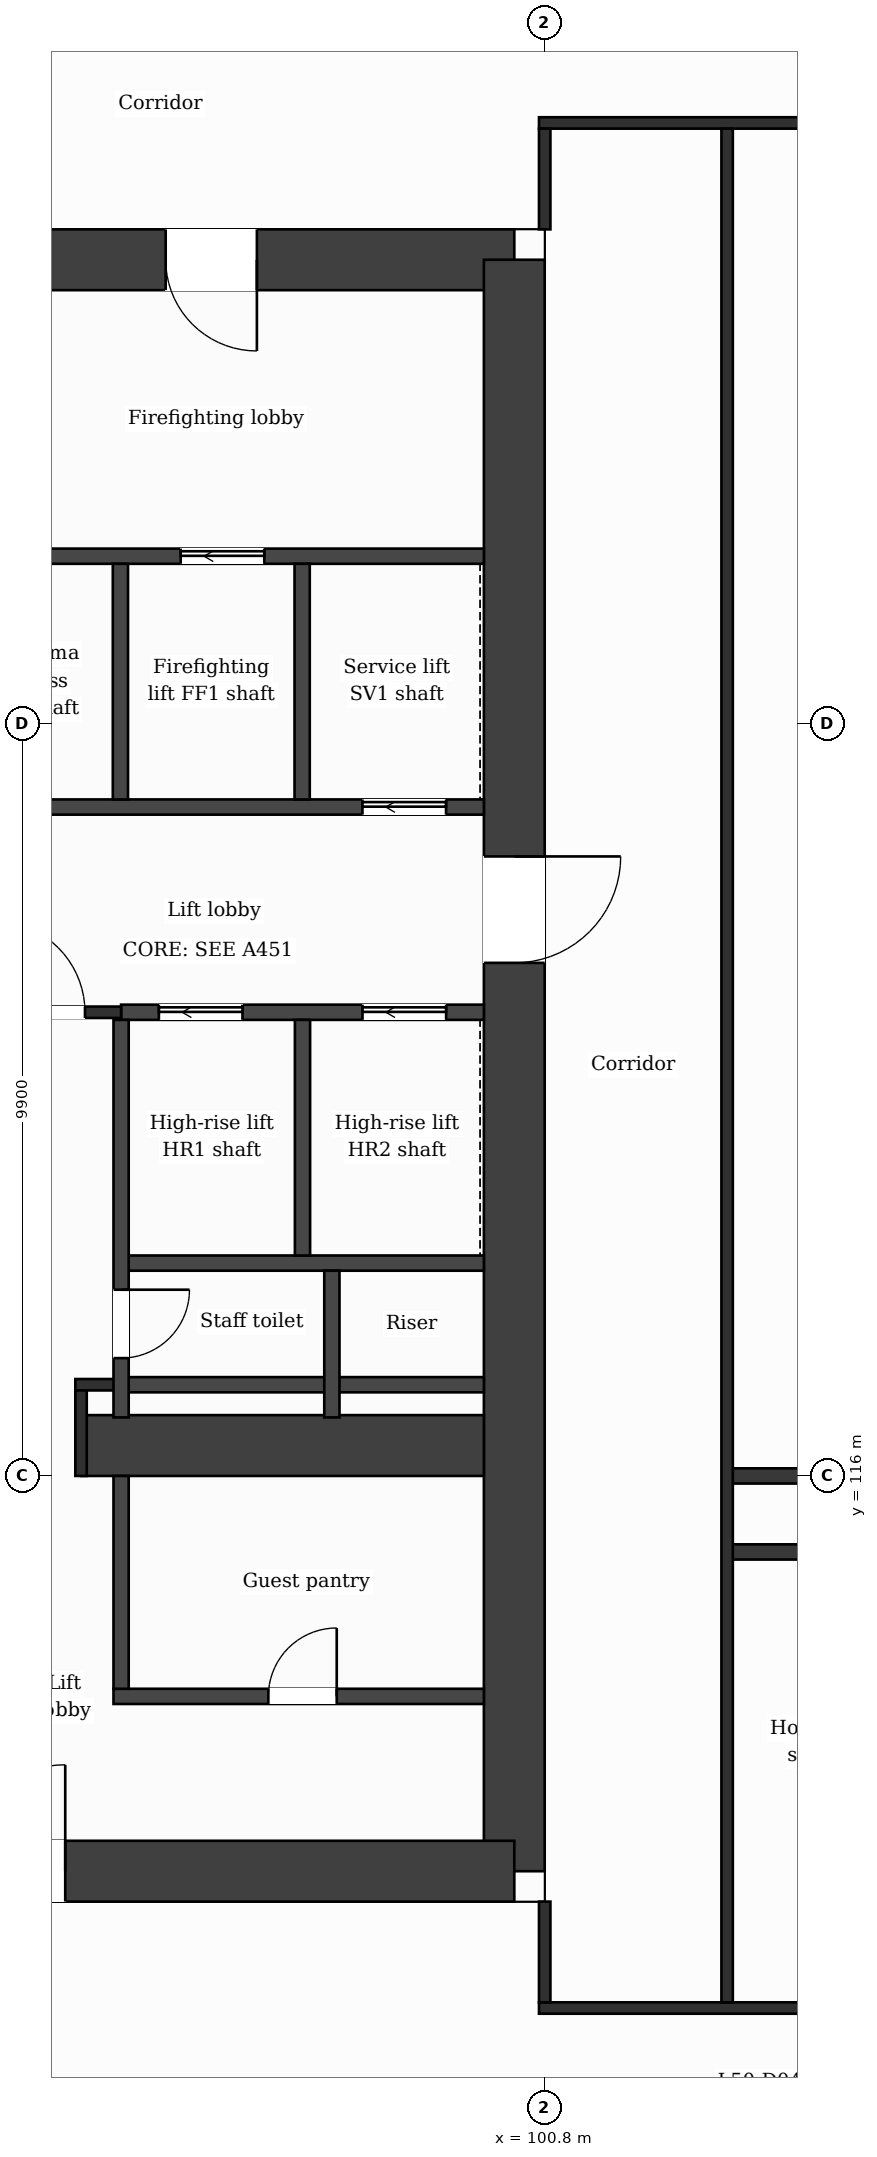
"""IFC4 building model, lengths in metres.
Left out: names, types, materials, properties, quantities, classifications, styles, units other than length and angle.
Written with IfcOpenShell. Run it as: python <this file> out.ifc"""

import sys

from ifc_helpers import new_model, si_unit, direction, frame, frame_2d, origin, place, context, subcontext, project, spatial, rectangle, extrude, element, fill, save


model = new_model("IFC4")
c1 = context("Model", 3, precision=1e-05, world=origin(), true_north=direction((0.0, 1.0)))
c2 = subcontext(c1, "Body", "Model", "MODEL_VIEW")
j1 = project(units=[si_unit("LENGTHUNIT", "METRE"), si_unit("PLANEANGLEUNIT", "RADIAN")], contexts=[c1])
p1 = place(None, origin())
s1 = spatial("IfcSite", under=j1, at=p1, CompositionType="ELEMENT")
p2 = place(p1, origin())
s2 = spatial("IfcBuilding", under=s1, at=p2, CompositionType="ELEMENT")
p3 = place(p2, frame((0.0, 0.0, 209.6)))
s3 = spatial("IfcBuildingStorey", under=s2, at=p3, CompositionType="ELEMENT", Elevation=209.6)
p4 = place(p3, frame((88.98, 132.0, 0.0), z_axis=(0.0, 0.0, 1.0), x_axis=(1.0, 0.0, 0.0)))
e1 = element("IfcWall", 1, at=p4, inside=s3, PredefinedType="SHEAR", context=c2, shape_type="SweptSolid", body=[
    extrude(rectangle(XDim=11.419, YDim=0.8, at=frame_2d((5.71, 0.0))), origin(), (0.0, 0.0, 1.0), 3.7),
])
p5 = place(p4, frame((6.833, 0.0, 0.0)))
e2 = element("IfcOpeningElement", 2, at=p5, cuts=e1, PredefinedType="OPENING", context=c2, shape_type="SweptSolid", body=[
    extrude(rectangle(XDim=1.2, YDim=2.1, at=frame_2d((0.6, 1.05))), frame((0.0, 0.41, 0.0), z_axis=(0.0, -1.0, 0.0), x_axis=(1.0, 0.0, 0.0)), (0.0, 0.0, 1.0), 0.82),
])
p6 = place(p3, frame((100.4, 132.0, 0.0), z_axis=(0.0, 0.0, 1.0), x_axis=(0.0, -1.0, 0.0)))
e3 = element("IfcWall", 3, at=p6, inside=s3, PredefinedType="SHEAR", context=c2, shape_type="SweptSolid", body=[
    extrude(rectangle(XDim=21.2, YDim=0.8, at=frame_2d((10.6, 0.0))), origin(), (0.0, 0.0, 1.0), 3.7),
])
p7 = place(p6, frame((7.85, 0.0, 0.0)))
e4 = element("IfcOpeningElement", 4, at=p7, cuts=e3, PredefinedType="OPENING", context=c2, shape_type="SweptSolid", body=[
    extrude(rectangle(XDim=1.4, YDim=2.1, at=frame_2d((0.7, 1.05))), frame((0.0, 0.41, 0.0), z_axis=(0.0, -1.0, 0.0), x_axis=(1.0, 0.0, 0.0)), (0.0, 0.0, 1.0), 0.82),
])
p8 = place(p3, frame((100.4, 110.8, 0.0), z_axis=(0.0, 0.0, 1.0), x_axis=(-1.0, 0.0, 0.0)))
e5 = element("IfcWall", 5, at=p8, inside=s3, PredefinedType="SHEAR", context=c2, shape_type="SweptSolid", body=[
    extrude(rectangle(XDim=14.273, YDim=0.8, at=frame_2d((7.137, 0.0))), origin(), (0.0, 0.0, 1.0), 3.7),
])
p9 = place(p8, frame((5.908, 0.0, 0.0)))
e6 = element("IfcOpeningElement", 6, at=p9, cuts=e5, PredefinedType="OPENING", context=c2, shape_type="SweptSolid", body=[
    extrude(rectangle(XDim=1.4, YDim=2.1, at=frame_2d((0.7, 1.05))), frame((0.0, 0.41, 0.0), z_axis=(0.0, -1.0, 0.0), x_axis=(1.0, 0.0, 0.0)), (0.0, 0.0, 1.0), 0.82),
])
p10 = place(p3, frame((94.7, 116.4, 0.0), z_axis=(0.0, 0.0, 1.0), x_axis=(1.0, 0.0, 0.0)))
e7 = element("IfcWall", 7, at=p10, inside=s3, PredefinedType="SHEAR", context=c2, shape_type="SweptSolid", body=[
    extrude(rectangle(XDim=5.3, YDim=0.8, at=frame_2d((2.65, 0.0))), origin(), (0.0, 0.0, 1.0), 3.7),
])
p11 = place(p3, frame((100.725, 109.0, 0.0), z_axis=(0.0, 0.0, 1.0), x_axis=(1.0, 0.0, 0.0)))
e8 = element("IfcWall", 8, at=p11, inside=s3, PredefinedType="PARTITIONING", context=c2, shape_type="SweptSolid", body=[
    extrude(rectangle(XDim=25.35, YDim=0.15, at=frame_2d((12.675, 0.0))), origin(), (0.0, 0.0, 1.0), 3.38),
])
p12 = place(p11, frame((6.15, 0.0, 0.0)))
e9 = element("IfcOpeningElement", 9, at=p12, cuts=e8, PredefinedType="OPENING", context=c2, shape_type="SweptSolid", body=[
    extrude(rectangle(XDim=1.0, YDim=2.1, at=frame_2d((0.5, 1.05))), frame((0.0, 0.085, 0.0), z_axis=(0.0, -1.0, 0.0), x_axis=(1.0, 0.0, 0.0)), (0.0, 0.0, 1.0), 0.17),
])
p13 = place(p11, frame((3.475, 0.0, 0.0)))
e10 = element("IfcOpeningElement", 10, at=p13, cuts=e8, PredefinedType="OPENING", context=c2, shape_type="SweptSolid", body=[
    extrude(rectangle(XDim=1.0, YDim=2.1, at=frame_2d((0.5, 1.05))), frame((0.0, 0.085, 0.0), z_axis=(0.0, -1.0, 0.0), x_axis=(1.0, 0.0, 0.0)), (0.0, 0.0, 1.0), 0.17),
])
p14 = place(p11, frame((12.175, 0.0, 0.0)))
e11 = element("IfcOpeningElement", 11, at=p14, cuts=e8, PredefinedType="OPENING", context=c2, shape_type="SweptSolid", body=[
    extrude(rectangle(XDim=1.0, YDim=2.1, at=frame_2d((0.5, 1.05))), frame((0.0, 0.085, 0.0), z_axis=(0.0, -1.0, 0.0), x_axis=(1.0, 0.0, 0.0)), (0.0, 0.0, 1.0), 0.17),
])
p15 = place(p11, frame((20.45, 0.0, 0.0)))
e12 = element("IfcOpeningElement", 12, at=p15, cuts=e8, PredefinedType="OPENING", context=c2, shape_type="SweptSolid", body=[
    extrude(rectangle(XDim=1.0, YDim=2.1, at=frame_2d((0.5, 1.05))), frame((0.0, 0.085, 0.0), z_axis=(0.0, -1.0, 0.0), x_axis=(1.0, 0.0, 0.0)), (0.0, 0.0, 1.0), 0.17),
])
p16 = place(p3, frame((95.127, 113.1, 0.0), z_axis=(0.0, 0.0, 1.0), x_axis=(1.0, 0.0, 0.0)))
e13 = element("IfcWall", 13, at=p16, inside=s3, PredefinedType="PARTITIONING", context=c2, shape_type="SweptSolid", body=[
    extrude(rectangle(XDim=4.873, YDim=0.2, at=frame_2d((2.437, 0.0))), origin(), (0.0, 0.0, 1.0), 3.38),
])
p17 = place(p16, frame((2.037, 0.0, 0.0)))
e14 = element("IfcOpeningElement", 14, at=p17, cuts=e13, PredefinedType="OPENING", context=c2, shape_type="SweptSolid", body=[
    extrude(rectangle(XDim=0.9, YDim=2.1, at=frame_2d((0.45, 1.05))), frame((0.0, 0.11, 0.0), z_axis=(0.0, -1.0, 0.0), x_axis=(1.0, 0.0, 0.0)), (0.0, 0.0, 1.0), 0.22),
])
p18 = place(p3, frame((103.2, 115.0, 0.0), z_axis=(0.0, 0.0, 1.0), x_axis=(1.0, 0.0, 0.0)))
e15 = element("IfcWall", 15, at=p18, inside=s3, PredefinedType="PARTITIONING", context=c2, shape_type="SweptSolid", body=[
    extrude(rectangle(XDim=3.1, YDim=0.2, at=frame_2d((1.55, 0.0))), origin(), (0.0, 0.0, 1.0), 3.38),
])
p19 = place(p3, frame((103.2, 116.0, 0.0), z_axis=(0.0, 0.0, 1.0), x_axis=(1.0, 0.0, 0.0)))
e16 = element("IfcWall", 16, at=p19, inside=s3, PredefinedType="PARTITIONING", context=c2, shape_type="SweptSolid", body=[
    extrude(rectangle(XDim=6.0, YDim=0.2, at=frame_2d((3.0, 0.0))), origin(), (0.0, 0.0, 1.0), 3.38),
])
p20 = place(p3, frame((95.227, 117.2, 0.0), z_axis=(0.0, 0.0, 1.0), x_axis=(1.0, 0.0, 0.0)))
e17 = element("IfcWall", 17, at=p20, inside=s3, PredefinedType="PARTITIONING", context=c2, shape_type="SweptSolid", body=[
    extrude(rectangle(XDim=4.773, YDim=0.2, at=frame_2d((2.386, 0.0))), origin(), (0.0, 0.0, 1.0), 3.38),
])
p21 = place(p3, frame((94.625, 117.2, 0.0), z_axis=(0.0, 0.0, 1.0), x_axis=(1.0, 0.0, 0.0)))
e18 = element("IfcWall", 18, at=p21, inside=s3, PredefinedType="PARTITIONING", context=c2, shape_type="SweptSolid", body=[
    extrude(rectangle(XDim=0.602, YDim=0.15, at=frame_2d((0.301, 0.0))), origin(), (0.0, 0.0, 1.0), 3.38),
])
p22 = place(p3, frame((95.227, 118.8, 0.0), z_axis=(0.0, 0.0, 1.0), x_axis=(1.0, 0.0, 0.0)))
e19 = element("IfcWall", 19, at=p22, inside=s3, PredefinedType="PARTITIONING", context=c2, shape_type="SweptSolid", body=[
    extrude(rectangle(XDim=4.773, YDim=0.2, at=frame_2d((2.386, 0.0))), origin(), (0.0, 0.0, 1.0), 3.38),
])
p23 = place(p3, frame((95.227, 122.1, 0.0), z_axis=(0.0, 0.0, 1.0), x_axis=(1.0, 0.0, 0.0)))
e20 = element("IfcWall", 20, at=p23, inside=s3, PredefinedType="PARTITIONING", context=c2, shape_type="SweptSolid", body=[
    extrude(rectangle(XDim=4.773, YDim=0.2, at=frame_2d((2.386, 0.0))), origin(), (0.0, 0.0, 1.0), 3.38),
])
p24 = place(p23, frame((0.497, 0.0, 0.0)))
e21 = element("IfcOpeningElement", 21, at=p24, cuts=e20, PredefinedType="OPENING", context=c2, shape_type="SweptSolid", body=[
    extrude(rectangle(XDim=1.1, YDim=2.1, at=frame_2d((0.55, 1.05))), frame((0.0, 0.11, 0.0), z_axis=(0.0, -1.0, 0.0), x_axis=(1.0, 0.0, 0.0)), (0.0, 0.0, 1.0), 0.22),
])
p25 = place(p23, frame((3.176, 0.0, 0.0)))
e22 = element("IfcOpeningElement", 22, at=p25, cuts=e20, PredefinedType="OPENING", context=c2, shape_type="SweptSolid", body=[
    extrude(rectangle(XDim=1.1, YDim=2.1, at=frame_2d((0.55, 1.05))), frame((0.0, 0.11, 0.0), z_axis=(0.0, -1.0, 0.0), x_axis=(1.0, 0.0, 0.0)), (0.0, 0.0, 1.0), 0.22),
])
p26 = place(p3, frame((92.827, 122.1, 0.0), z_axis=(0.0, 0.0, 1.0), x_axis=(1.0, 0.0, 0.0)))
e23 = element("IfcWall", 23, at=p26, inside=s3, PredefinedType="PARTITIONING", context=c2, shape_type="SweptSolid", body=[
    extrude(rectangle(XDim=2.4, YDim=0.15, at=frame_2d((1.2, 0.0))), origin(), (0.0, 0.0, 1.0), 3.38),
])
p27 = place(p26, frame((0.725, 0.0, 0.0)))
e24 = element("IfcOpeningElement", 24, at=p27, cuts=e23, PredefinedType="OPENING", context=c2, shape_type="SweptSolid", body=[
    extrude(rectangle(XDim=1.2, YDim=2.1, at=frame_2d((0.6, 1.05))), frame((0.0, 0.085, 0.0), z_axis=(0.0, -1.0, 0.0), x_axis=(1.0, 0.0, 0.0)), (0.0, 0.0, 1.0), 0.17),
])
p28 = place(p3, frame((92.702, 124.8, 0.0), z_axis=(0.0, 0.0, 1.0), x_axis=(1.0, 0.0, 0.0)))
e25 = element("IfcWall", 25, at=p28, inside=s3, PredefinedType="PARTITIONING", context=c2, shape_type="SweptSolid", body=[
    extrude(rectangle(XDim=7.298, YDim=0.2, at=frame_2d((3.649, 0.0))), origin(), (0.0, 0.0, 1.0), 3.38),
])
p29 = place(p28, frame((5.7, 0.0, 0.0)))
e26 = element("IfcOpeningElement", 26, at=p29, cuts=e25, PredefinedType="OPENING", context=c2, shape_type="SweptSolid", body=[
    extrude(rectangle(XDim=1.1, YDim=2.1, at=frame_2d((0.55, 1.05))), frame((0.0, 0.11, 0.0), z_axis=(0.0, -1.0, 0.0), x_axis=(1.0, 0.0, 0.0)), (0.0, 0.0, 1.0), 0.22),
])
p30 = place(p3, frame((92.827, 128.1, 0.0), z_axis=(0.0, 0.0, 1.0), x_axis=(1.0, 0.0, 0.0)))
e27 = element("IfcWall", 27, at=p30, inside=s3, PredefinedType="PARTITIONING", context=c2, shape_type="SweptSolid", body=[
    extrude(rectangle(XDim=7.173, YDim=0.2, at=frame_2d((3.586, 0.0))), origin(), (0.0, 0.0, 1.0), 3.38),
])
p31 = place(p30, frame((3.184, 0.0, 0.0)))
e28 = element("IfcOpeningElement", 28, at=p31, cuts=e27, PredefinedType="OPENING", context=c2, shape_type="SweptSolid", body=[
    extrude(rectangle(XDim=1.1, YDim=2.1, at=frame_2d((0.55, 1.05))), frame((0.0, 0.11, 0.0), z_axis=(0.0, -1.0, 0.0), x_axis=(1.0, 0.0, 0.0)), (0.0, 0.0, 1.0), 0.22),
])
p32 = place(p3, frame((100.725, 133.8, 0.0), z_axis=(0.0, 0.0, 1.0), x_axis=(1.0, 0.0, 0.0)))
e29 = element("IfcWall", 29, at=p32, inside=s3, PredefinedType="PARTITIONING", context=c2, shape_type="SweptSolid", body=[
    extrude(rectangle(XDim=25.35, YDim=0.15, at=frame_2d((12.675, 0.0))), origin(), (0.0, 0.0, 1.0), 3.38),
])
p33 = place(p32, frame((4.545, 0.0, 0.0)))
e30 = element("IfcOpeningElement", 30, at=p33, cuts=e29, PredefinedType="OPENING", context=c2, shape_type="SweptSolid", body=[
    extrude(rectangle(XDim=1.0, YDim=2.1, at=frame_2d((0.5, 1.05))), frame((0.0, 0.085, 0.0), z_axis=(0.0, -1.0, 0.0), x_axis=(1.0, 0.0, 0.0)), (0.0, 0.0, 1.0), 0.17),
])
p34 = place(p32, frame((12.845, 0.0, 0.0)))
e31 = element("IfcOpeningElement", 31, at=p34, cuts=e29, PredefinedType="OPENING", context=c2, shape_type="SweptSolid", body=[
    extrude(rectangle(XDim=1.0, YDim=2.1, at=frame_2d((0.5, 1.05))), frame((0.0, 0.085, 0.0), z_axis=(0.0, -1.0, 0.0), x_axis=(1.0, 0.0, 0.0)), (0.0, 0.0, 1.0), 0.17),
])
p35 = place(p32, frame((20.45, 0.0, 0.0)))
e32 = element("IfcOpeningElement", 32, at=p35, cuts=e29, PredefinedType="OPENING", context=c2, shape_type="SweptSolid", body=[
    extrude(rectangle(XDim=1.0, YDim=2.1, at=frame_2d((0.5, 1.05))), frame((0.0, 0.085, 0.0), z_axis=(0.0, -1.0, 0.0), x_axis=(1.0, 0.0, 0.0)), (0.0, 0.0, 1.0), 0.17),
])
p36 = place(p3, frame((94.7, 116.0, 0.0), z_axis=(0.0, 0.0, 1.0), x_axis=(0.0, 1.0, 0.0)))
e33 = element("IfcWall", 33, at=p36, inside=s3, PredefinedType="PARTITIONING", context=c2, shape_type="SweptSolid", body=[
    extrude(rectangle(XDim=1.125, YDim=0.15, at=frame_2d((0.562, 0.0))), origin(), (0.0, 0.0, 1.0), 3.38),
])
p37 = place(p3, frame((95.218, 124.9, 0.0), z_axis=(0.0, 0.0, 1.0), x_axis=(0.0, 1.0, 0.0)))
e34 = element("IfcWall", 34, at=p37, inside=s3, PredefinedType="PARTITIONING", context=c2, shape_type="SweptSolid", body=[
    extrude(rectangle(XDim=3.1, YDim=0.2, at=frame_2d((1.55, 0.0))), origin(), (0.0, 0.0, 1.0), 3.38),
])
p38 = place(p3, frame((95.227, 113.2, 0.0), z_axis=(0.0, 0.0, 1.0), x_axis=(0.0, 1.0, 0.0)))
e35 = element("IfcWall", 35, at=p38, inside=s3, PredefinedType="PARTITIONING", context=c2, shape_type="SweptSolid", body=[
    extrude(rectangle(XDim=2.8, YDim=0.2, at=frame_2d((1.4, 0.0))), origin(), (0.0, 0.0, 1.0), 3.38),
])
p39 = place(p3, frame((95.227, 116.77, 0.0), z_axis=(0.0, 0.0, 1.0), x_axis=(0.0, 1.0, 0.0)))
e36 = element("IfcWall", 36, at=p39, inside=s3, PredefinedType="PARTITIONING", context=c2, shape_type="SweptSolid", body=[
    extrude(rectangle(XDim=5.23, YDim=0.2, at=frame_2d((2.615, 0.0))), origin(), (0.0, 0.0, 1.0), 3.38),
])
p40 = place(p39, frame((0.78, 0.0, 0.0)))
e37 = element("IfcOpeningElement", 37, at=p40, cuts=e36, PredefinedType="OPENING", context=c2, shape_type="SweptSolid", body=[
    extrude(rectangle(XDim=0.9, YDim=2.1, at=frame_2d((0.45, 1.05))), frame((0.0, 0.11, 0.0), z_axis=(0.0, -1.0, 0.0), x_axis=(1.0, 0.0, 0.0)), (0.0, 0.0, 1.0), 0.22),
])
for number, where, z_axis, x_axis in (
    (38, (97.609, 124.9, 0.0), (0.0, 0.0, 1.0), (0.0, 1.0, 0.0)),
    (39, (97.614, 118.9, 0.0), (0.0, 0.0, 1.0), (0.0, 1.0, 0.0)),
):
    element("IfcWall", number, at=place(p3, frame(where, z_axis=z_axis, x_axis=x_axis)), inside=s3, PredefinedType="PARTITIONING", context=c2, shape_type="SweptSolid", body=[
        extrude(rectangle(XDim=3.1, YDim=0.2, at=frame_2d((1.55, 0.0))), origin(), (0.0, 0.0, 1.0), 3.38),
    ])
p41 = place(p3, frame((98.0, 116.77, 0.0), z_axis=(0.0, 0.0, 1.0), x_axis=(0.0, 1.0, 0.0)))
e40 = element("IfcWall", 40, at=p41, inside=s3, PredefinedType="PARTITIONING", context=c2, shape_type="SweptSolid", body=[
    extrude(rectangle(XDim=1.93, YDim=0.2, at=frame_2d((0.965, 0.0))), origin(), (0.0, 0.0, 1.0), 3.38),
])
p42 = place(p3, frame((100.8, 109.075, 0.0), z_axis=(0.0, 0.0, 1.0), x_axis=(0.0, 1.0, 0.0)))
e41 = element("IfcWall", 41, at=p42, inside=s3, PredefinedType="PARTITIONING", context=c2, shape_type="SweptSolid", body=[
    extrude(rectangle(XDim=1.325, YDim=0.15, at=frame_2d((0.663, 0.0))), origin(), (0.0, 0.0, 1.0), 3.38),
])
p43 = place(p3, frame((100.8, 132.4, 0.0), z_axis=(0.0, 0.0, 1.0), x_axis=(0.0, 1.0, 0.0)))
e42 = element("IfcWall", 42, at=p43, inside=s3, PredefinedType="PARTITIONING", context=c2, shape_type="SweptSolid", body=[
    extrude(rectangle(XDim=1.325, YDim=0.15, at=frame_2d((0.663, 0.0))), origin(), (0.0, 0.0, 1.0), 3.38),
])
p44 = place(p3, frame((103.2, 109.075, 0.0), z_axis=(0.0, 0.0, 1.0), x_axis=(0.0, 1.0, 0.0)))
e43 = element("IfcWall", 43, at=p44, inside=s3, PredefinedType="PARTITIONING", context=c2, shape_type="SweptSolid", body=[
    extrude(rectangle(XDim=24.65, YDim=0.15, at=frame_2d((12.325, 0.0))), origin(), (0.0, 0.0, 1.0), 3.38),
])
p45 = place(p27, origin())
e44 = element("IfcDoor", 44, at=p45, inside=s3, OperationType="SINGLE_SWING_LEFT", PredefinedType="DOOR", context=c2, shape_type="SweptSolid", body=[
    extrude(rectangle(XDim=1.2, YDim=2.1, at=frame_2d((0.6, 1.05))), frame((0.0, 0.025, 0.0), z_axis=(0.0, -1.0, 0.0), x_axis=(1.0, 0.0, 0.0)), (0.0, 0.0, 1.0), 0.05),
])
fill(e24, e44)
p46 = place(p24, origin())
e45 = element("IfcDoor", 45, at=p46, inside=s3, OperationType="SLIDING_TO_LEFT", PredefinedType="DOOR", context=c2, shape_type="SweptSolid", body=[
    extrude(rectangle(XDim=1.1, YDim=2.1, at=frame_2d((0.55, 1.05))), frame((0.0, 0.025, 0.0), z_axis=(0.0, -1.0, 0.0), x_axis=(1.0, 0.0, 0.0)), (0.0, 0.0, 1.0), 0.05),
])
fill(e21, e45)
p47 = place(p25, origin())
e46 = element("IfcDoor", 46, at=p47, inside=s3, OperationType="SLIDING_TO_LEFT", PredefinedType="DOOR", context=c2, shape_type="SweptSolid", body=[
    extrude(rectangle(XDim=1.1, YDim=2.1, at=frame_2d((0.55, 1.05))), frame((0.0, 0.025, 0.0), z_axis=(0.0, -1.0, 0.0), x_axis=(1.0, 0.0, 0.0)), (0.0, 0.0, 1.0), 0.05),
])
fill(e22, e46)
p48 = place(p31, origin())
e47 = element("IfcDoor", 47, at=p48, inside=s3, OperationType="SLIDING_TO_LEFT", PredefinedType="DOOR", context=c2, shape_type="SweptSolid", body=[
    extrude(rectangle(XDim=1.1, YDim=2.1, at=frame_2d((0.55, 1.05))), frame((0.0, 0.025, 0.0), z_axis=(0.0, -1.0, 0.0), x_axis=(1.0, 0.0, 0.0)), (0.0, 0.0, 1.0), 0.05),
])
fill(e28, e47)
p49 = place(p29, origin())
e48 = element("IfcDoor", 48, at=p49, inside=s3, OperationType="SLIDING_TO_LEFT", PredefinedType="DOOR", context=c2, shape_type="SweptSolid", body=[
    extrude(rectangle(XDim=1.1, YDim=2.1, at=frame_2d((0.55, 1.05))), frame((0.0, 0.025, 0.0), z_axis=(0.0, -1.0, 0.0), x_axis=(1.0, 0.0, 0.0)), (0.0, 0.0, 1.0), 0.05),
])
fill(e26, e48)
p50 = place(p40, origin())
e49 = element("IfcDoor", 49, at=p50, inside=s3, OperationType="SINGLE_SWING_RIGHT", PredefinedType="DOOR", context=c2, shape_type="SweptSolid", body=[
    extrude(rectangle(XDim=0.9, YDim=2.1, at=frame_2d((0.45, 1.05))), frame((0.0, 0.025, 0.0), z_axis=(0.0, -1.0, 0.0), x_axis=(1.0, 0.0, 0.0)), (0.0, 0.0, 1.0), 0.05),
])
fill(e37, e49)
p51 = place(p17, origin())
e50 = element("IfcDoor", 50, at=p51, inside=s3, OperationType="SINGLE_SWING_RIGHT", PredefinedType="DOOR", context=c2, shape_type="SweptSolid", body=[
    extrude(rectangle(XDim=0.9, YDim=2.1, at=frame_2d((0.45, 1.05))), frame((0.0, 0.025, 0.0), z_axis=(0.0, -1.0, 0.0), x_axis=(1.0, 0.0, 0.0)), (0.0, 0.0, 1.0), 0.05),
])
fill(e14, e50)
p52 = place(p9, origin())
e51 = element("IfcDoor", 51, at=p52, inside=s3, OperationType="SINGLE_SWING_LEFT", PredefinedType="DOOR", context=c2, shape_type="SweptSolid", body=[
    extrude(rectangle(XDim=1.4, YDim=2.1, at=frame_2d((0.7, 1.05))), frame((0.0, 0.025, 0.0), z_axis=(0.0, -1.0, 0.0), x_axis=(1.0, 0.0, 0.0)), (0.0, 0.0, 1.0), 0.05),
])
fill(e6, e51)
p53 = place(p5, origin())
e52 = element("IfcDoor", 52, at=p53, inside=s3, OperationType="SINGLE_SWING_RIGHT", PredefinedType="DOOR", context=c2, shape_type="SweptSolid", body=[
    extrude(rectangle(XDim=1.2, YDim=2.1, at=frame_2d((0.6, 1.05))), frame((0.0, 0.025, 0.0), z_axis=(0.0, -1.0, 0.0), x_axis=(1.0, 0.0, 0.0)), (0.0, 0.0, 1.0), 0.05),
])
fill(e2, e52)
p54 = place(p7, origin())
e53 = element("IfcDoor", 53, at=p54, inside=s3, OperationType="SINGLE_SWING_LEFT", PredefinedType="DOOR", context=c2, shape_type="SweptSolid", body=[
    extrude(rectangle(XDim=1.4, YDim=2.1, at=frame_2d((0.7, 1.05))), frame((0.0, 0.025, 0.0), z_axis=(0.0, -1.0, 0.0), x_axis=(1.0, 0.0, 0.0)), (0.0, 0.0, 1.0), 0.05),
])
fill(e4, e53)
save(model, sys.argv[1])
